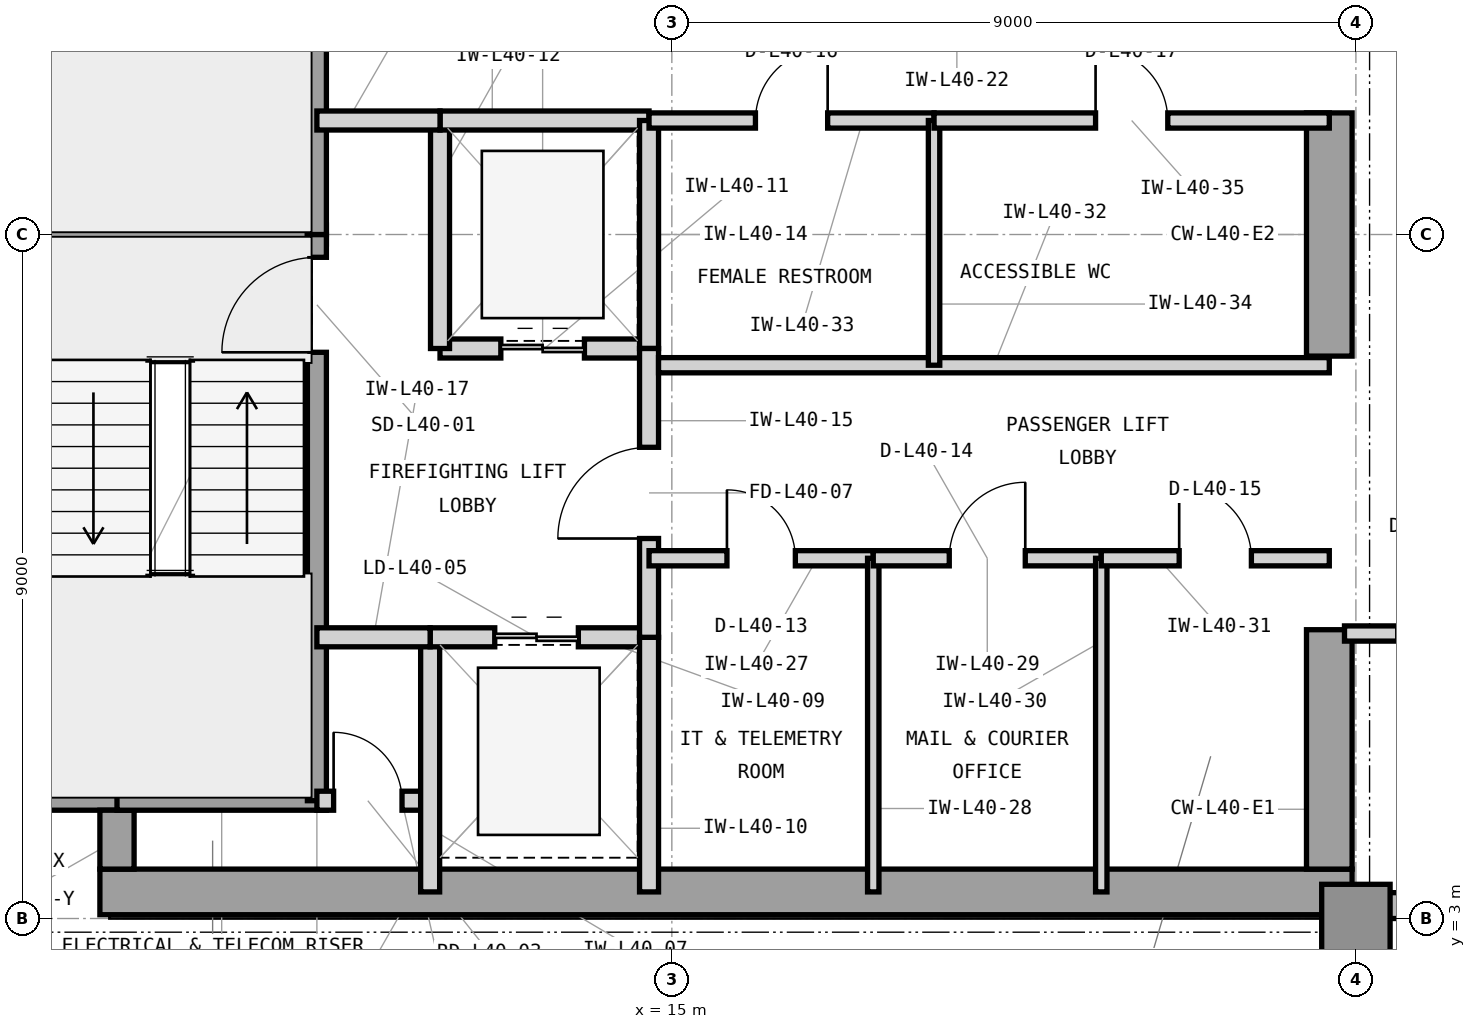
"""IFC4 building model, lengths in metres.
Left out: names, types, materials, properties, quantities, classifications, styles, units other than length and angle.
Written with IfcOpenShell. Run it as: python <this file> out.ifc"""

import sys

from ifc_helpers import new_model, si_unit, direction, frame, frame_2d, origin, origin_2d, place, context, subcontext, project, spatial, rectangle, extrude, element, fill, save


model = new_model("IFC4")
c1 = context("Model", 3, precision=1e-05, world=origin(), true_north=direction((0.0, 1.0)))
c2 = subcontext(c1, "Body", "Model", "MODEL_VIEW")
j1 = project(units=[si_unit("LENGTHUNIT", "METRE"), si_unit("PLANEANGLEUNIT", "RADIAN")], contexts=[c1])
p1 = place(None, origin())
s1 = spatial("IfcSite", under=j1, at=p1, CompositionType="ELEMENT")
p2 = place(p1, origin())
s2 = spatial("IfcBuilding", under=s1, at=p2, CompositionType="ELEMENT")
p3 = place(p2, frame((0.0, 0.0, 168.3)))
s3 = spatial("IfcBuildingStorey", under=s2, at=p3, CompositionType="ELEMENT", Elevation=168.3)
p4 = place(p3, frame((7.475, 3.35, 0.0), z_axis=(0.0, 0.0, 1.0), x_axis=(1.0, 0.0, 0.0)))
e1 = element("IfcWall", 1, at=p4, inside=s3, PredefinedType="SHEAR", context=c2, shape_type="SweptSolid", body=[
    extrude(rectangle(XDim=16.475, YDim=0.6, at=frame_2d((8.237, 0.0))), origin(), (0.0, 0.0, 1.0), 3.9),
])
p5 = place(p3, frame((23.65, 3.65, 0.0), z_axis=(0.0, 0.0, 1.0), x_axis=(0.0, 1.0, 0.0)))
e2 = element("IfcWall", 2, at=p5, inside=s3, PredefinedType="SHEAR", context=c2, shape_type="SweptSolid", body=[
    extrude(rectangle(XDim=3.15, YDim=0.6, at=frame_2d((1.575, 0.0))), origin(), (0.0, 0.0, 1.0), 3.9),
])
p6 = place(p3, frame((23.65, 10.4, 0.0), z_axis=(0.0, 0.0, 1.0), x_axis=(0.0, 1.0, 0.0)))
e3 = element("IfcWall", 3, at=p6, inside=s3, PredefinedType="SHEAR", context=c2, shape_type="SweptSolid", body=[
    extrude(rectangle(XDim=3.2, YDim=0.6, at=frame_2d((1.6, 0.0))), origin(), (0.0, 0.0, 1.0), 3.9),
])
p7 = place(p3, frame((6.65, 4.65, 0.0), z_axis=(0.0, 0.0, 1.0), x_axis=(1.0, 0.0, 0.0)))
e4 = element("IfcWall", 4, at=p7, inside=s3, PredefinedType="SHEAR", context=c2, shape_type="SweptSolid", body=[
    extrude(rectangle(XDim=1.275, YDim=0.45, at=frame_2d((0.638, 0.0))), origin(), (0.0, 0.0, 1.0), 3.9),
])
p8 = place(p3, frame((7.7, 3.65, 0.0), z_axis=(0.0, 0.0, 1.0), x_axis=(0.0, 1.0, 0.0)))
e5 = element("IfcWall", 5, at=p8, inside=s3, PredefinedType="SHEAR", context=c2, shape_type="SweptSolid", body=[
    extrude(rectangle(XDim=0.775, YDim=0.45, at=frame_2d((0.388, 0.0))), origin(), (0.0, 0.0, 1.0), 3.9),
])
p9 = place(p3, frame((24.0, 3.0, 0.0), z_axis=(0.0, 0.0, 1.0), x_axis=(1.0, 0.0, 0.0)))
e6 = element("IfcColumn", 6, at=p9, inside=s3, PredefinedType="COLUMN", context=c2, shape_type="SweptSolid", body=[
    extrude(rectangle(XDim=0.9, YDim=0.9, at=origin_2d()), origin(), (0.0, 0.0, 1.0), 3.9),
])
p10 = place(p3, frame((23.9, 3.17, 0.0), z_axis=(0.0, 0.0, 1.0), x_axis=(1.0, 0.0, 0.0)))
e7 = element("IfcWall", 7, at=p10, inside=s3, PredefinedType="STANDARD", context=c2, shape_type="SweptSolid", body=[
    extrude(rectangle(XDim=31.5, YDim=0.34, at=frame_2d((15.75, 0.0))), origin(), (0.0, 0.0, 1.0), 3.7),
])
p11 = place(p10, frame((5.6, 0.0, 0.9)))
e8 = element("IfcOpeningElement", 8, at=p11, cuts=e7, PredefinedType="OPENING", context=c2, shape_type="SweptSolid", body=[
    extrude(rectangle(XDim=2.3, YDim=2.2, at=frame_2d((1.15, 1.1))), frame((0.0, 0.18, 0.0), z_axis=(0.0, -1.0, 0.0), x_axis=(1.0, 0.0, 0.0)), (0.0, 0.0, 1.0), 0.36),
])
p12 = place(p10, frame((10.1, 0.0, 0.9)))
e9 = element("IfcOpeningElement", 9, at=p12, cuts=e7, PredefinedType="OPENING", context=c2, shape_type="SweptSolid", body=[
    extrude(rectangle(XDim=2.3, YDim=2.2, at=frame_2d((1.15, 1.1))), frame((0.0, 0.18, 0.0), z_axis=(0.0, -1.0, 0.0), x_axis=(1.0, 0.0, 0.0)), (0.0, 0.0, 1.0), 0.36),
])
p13 = place(p10, frame((19.1, 0.0, 0.9)))
e10 = element("IfcOpeningElement", 10, at=p13, cuts=e7, PredefinedType="OPENING", context=c2, shape_type="SweptSolid", body=[
    extrude(rectangle(XDim=2.3, YDim=2.2, at=frame_2d((1.15, 1.1))), frame((0.0, 0.18, 0.0), z_axis=(0.0, -1.0, 0.0), x_axis=(1.0, 0.0, 0.0)), (0.0, 0.0, 1.0), 0.36),
])
p14 = place(p10, frame((0.9, 0.0, 0.9)))
e11 = element("IfcOpeningElement", 11, at=p14, cuts=e7, PredefinedType="OPENING", context=c2, shape_type="SweptSolid", body=[
    extrude(rectangle(XDim=1.6, YDim=2.2, at=frame_2d((0.8, 1.1))), frame((0.0, 0.18, 0.0), z_axis=(0.0, -1.0, 0.0), x_axis=(1.0, 0.0, 0.0)), (0.0, 0.0, 1.0), 0.36),
])
p15 = place(p3, frame((6.35, 12.0, 0.0), z_axis=(0.0, 0.0, 1.0), x_axis=(1.0, 0.0, 0.0)))
e12 = element("IfcWall", 12, at=p15, inside=s3, PredefinedType="SHEAR", context=c2, shape_type="SweptSolid", body=[
    extrude(rectangle(XDim=4.105, YDim=0.25, at=frame_2d((2.052, 0.0))), origin(), (0.0, 0.0, 1.0), 3.9),
])
p16 = place(p3, frame((7.7, 4.55, 0.0), z_axis=(0.0, 0.0, 1.0), x_axis=(1.0, 0.0, 0.0)))
e13 = element("IfcWall", 13, at=p16, inside=s3, PredefinedType="SHEAR", context=c2, shape_type="SweptSolid", body=[
    extrude(rectangle(XDim=2.755, YDim=0.25, at=frame_2d((1.377, 0.0))), origin(), (0.0, 0.0, 1.0), 3.9),
])
p17 = place(p3, frame((10.33, 4.55, 0.0), z_axis=(0.0, 0.0, 1.0), x_axis=(0.0, 1.0, 0.0)))
e14 = element("IfcWall", 14, at=p17, inside=s3, PredefinedType="SHEAR", context=c2, shape_type="SweptSolid", body=[
    extrude(rectangle(XDim=7.45, YDim=0.25, at=frame_2d((3.725, 0.0))), origin(), (0.0, 0.0, 1.0), 3.9),
])
p18 = place(p17, frame((5.9, 0.0, 0.0)))
e15 = element("IfcOpeningElement", 15, at=p18, cuts=e14, PredefinedType="OPENING", context=c2, shape_type="SweptSolid", body=[
    extrude(rectangle(XDim=1.25, YDim=2.2, at=frame_2d((0.625, 1.1))), frame((0.0, 0.135, 0.0), z_axis=(0.0, -1.0, 0.0), x_axis=(1.0, 0.0, 0.0)), (0.0, 0.0, 1.0), 0.27),
])
p19 = place(p3, frame((10.33, 12.0, 0.0), z_axis=(0.0, 0.0, 1.0), x_axis=(0.0, 1.0, 0.0)))
e16 = element("IfcWall", 16, at=p19, inside=s3, PredefinedType="SHEAR", context=c2, shape_type="SweptSolid", body=[
    extrude(rectangle(XDim=7.45, YDim=0.25, at=frame_2d((3.725, 0.0))), origin(), (0.0, 0.0, 1.0), 3.9),
])
p20 = place(p19, frame((5.85, 0.0, 0.0)))
e17 = element("IfcOpeningElement", 17, at=p20, cuts=e16, PredefinedType="OPENING", context=c2, shape_type="SweptSolid", body=[
    extrude(rectangle(XDim=1.25, YDim=2.2, at=frame_2d((0.625, 1.1))), frame((0.0, 0.135, 0.0), z_axis=(0.0, -1.0, 0.0), x_axis=(1.0, 0.0, 0.0)), (0.0, 0.0, 1.0), 0.27),
])
p21 = place(p3, frame((10.33, 4.55, 0.0), z_axis=(0.0, 0.0, 1.0), x_axis=(1.0, 0.0, 0.0)))
e18 = element("IfcWall", 18, at=p21, inside=s3, PredefinedType="PARTITIONING", context=c2, shape_type="SweptSolid", body=[
    extrude(rectangle(XDim=1.49, YDim=0.25, at=frame_2d((0.745, 0.0))), origin(), (0.0, 0.0, 1.0), 3.69),
])
p22 = place(p21, frame((0.22, 0.0, 0.0)))
e19 = element("IfcOpeningElement", 19, at=p22, cuts=e18, PredefinedType="OPENING", context=c2, shape_type="SweptSolid", body=[
    extrude(rectangle(XDim=0.9, YDim=2.1, at=frame_2d((0.45, 1.05))), frame((0.0, 0.135, 0.0), z_axis=(0.0, -1.0, 0.0), x_axis=(1.0, 0.0, 0.0)), (0.0, 0.0, 1.0), 0.27),
])
p23 = place(p3, frame((11.82, 3.35, 0.0), z_axis=(0.0, 0.0, 1.0), x_axis=(0.0, 1.0, 0.0)))
e20 = element("IfcWall", 20, at=p23, inside=s3, PredefinedType="PARTITIONING", context=c2, shape_type="SweptSolid", body=[
    extrude(rectangle(XDim=3.35, YDim=0.25, at=frame_2d((1.675, 0.0))), origin(), (0.0, 0.0, 1.0), 3.69),
])
p24 = place(p3, frame((11.82, 6.7, 0.0), z_axis=(0.0, 0.0, 1.0), x_axis=(1.0, 0.0, 0.0)))
e21 = element("IfcWall", 21, at=p24, inside=s3, PredefinedType="PARTITIONING", context=c2, shape_type="SweptSolid", body=[
    extrude(rectangle(XDim=2.88, YDim=0.25, at=frame_2d((1.44, 0.0))), origin(), (0.0, 0.0, 1.0), 3.283),
])
p25 = place(p24, frame((0.85, 0.0, 0.0)))
e22 = element("IfcOpeningElement", 22, at=p25, cuts=e21, PredefinedType="OPENING", context=c2, shape_type="SweptSolid", body=[
    extrude(rectangle(XDim=1.1, YDim=2.25, at=frame_2d((0.55, 1.125))), frame((0.0, 0.135, 0.0), z_axis=(0.0, -1.0, 0.0), x_axis=(1.0, 0.0, 0.0)), (0.0, 0.0, 1.0), 0.27),
])
p26 = place(p3, frame((14.7, 3.35, 0.0), z_axis=(0.0, 0.0, 1.0), x_axis=(0.0, 1.0, 0.0)))
e23 = element("IfcWall", 23, at=p26, inside=s3, PredefinedType="PARTITIONING", context=c2, shape_type="SweptSolid", body=[
    extrude(rectangle(XDim=3.35, YDim=0.25, at=frame_2d((1.675, 0.0))), origin(), (0.0, 0.0, 1.0), 3.69),
])
p27 = place(p3, frame((11.95, 10.5, 0.0), z_axis=(0.0, 0.0, 1.0), x_axis=(1.0, 0.0, 0.0)))
e24 = element("IfcWall", 24, at=p27, inside=s3, PredefinedType="PARTITIONING", context=c2, shape_type="SweptSolid", body=[
    extrude(rectangle(XDim=2.75, YDim=0.25, at=frame_2d((1.375, 0.0))), origin(), (0.0, 0.0, 1.0), 3.283),
])
p28 = place(p27, frame((0.8, 0.0, 0.0)))
e25 = element("IfcOpeningElement", 25, at=p28, cuts=e24, PredefinedType="OPENING", context=c2, shape_type="SweptSolid", body=[
    extrude(rectangle(XDim=1.1, YDim=2.25, at=frame_2d((0.55, 1.125))), frame((0.0, 0.135, 0.0), z_axis=(0.0, -1.0, 0.0), x_axis=(1.0, 0.0, 0.0)), (0.0, 0.0, 1.0), 0.27),
])
p29 = place(p3, frame((11.95, 10.5, 0.0), z_axis=(0.0, 0.0, 1.0), x_axis=(0.0, 1.0, 0.0)))
e26 = element("IfcWall", 26, at=p29, inside=s3, PredefinedType="PARTITIONING", context=c2, shape_type="SweptSolid", body=[
    extrude(rectangle(XDim=3.0, YDim=0.25, at=frame_2d((1.5, 0.0))), origin(), (0.0, 0.0, 1.0), 3.69),
])
p30 = place(p3, frame((11.95, 13.5, 0.0), z_axis=(0.0, 0.0, 1.0), x_axis=(1.0, 0.0, 0.0)))
e27 = element("IfcWall", 27, at=p30, inside=s3, PredefinedType="PARTITIONING", context=c2, shape_type="SweptSolid", body=[
    extrude(rectangle(XDim=2.75, YDim=0.25, at=frame_2d((1.375, 0.0))), origin(), (0.0, 0.0, 1.0), 3.283),
])
p31 = place(p3, frame((14.7, 10.5, 0.0), z_axis=(0.0, 0.0, 1.0), x_axis=(0.0, 1.0, 0.0)))
e28 = element("IfcWall", 28, at=p31, inside=s3, PredefinedType="PARTITIONING", context=c2, shape_type="SweptSolid", body=[
    extrude(rectangle(XDim=3.0, YDim=0.25, at=frame_2d((1.5, 0.0))), origin(), (0.0, 0.0, 1.0), 3.69),
])
p32 = place(p3, frame((14.7, 6.7, 0.0), z_axis=(0.0, 0.0, 1.0), x_axis=(0.0, 1.0, 0.0)))
e29 = element("IfcWall", 29, at=p32, inside=s3, PredefinedType="PARTITIONING", context=c2, shape_type="SweptSolid", body=[
    extrude(rectangle(XDim=3.8, YDim=0.25, at=frame_2d((1.9, 0.0))), origin(), (0.0, 0.0, 1.0), 3.69),
])
p33 = place(p32, frame((1.3, 0.0, 0.0)))
e30 = element("IfcOpeningElement", 30, at=p33, cuts=e29, PredefinedType="OPENING", context=c2, shape_type="SweptSolid", body=[
    extrude(rectangle(XDim=1.2, YDim=2.2, at=frame_2d((0.6, 1.1))), frame((0.0, 0.135, 0.0), z_axis=(0.0, -1.0, 0.0), x_axis=(1.0, 0.0, 0.0)), (0.0, 0.0, 1.0), 0.27),
])
p34 = place(p3, frame((10.33, 13.5, 0.0), z_axis=(0.0, 0.0, 1.0), x_axis=(1.0, 0.0, 0.0)))
e31 = element("IfcWall", 31, at=p34, inside=s3, PredefinedType="PARTITIONING", context=c2, shape_type="SweptSolid", body=[
    extrude(rectangle(XDim=1.62, YDim=0.25, at=frame_2d((0.81, 0.0))), origin(), (0.0, 0.0, 1.0), 3.283),
])
p35 = place(p3, frame((10.33, 6.7, 0.0), z_axis=(0.0, 0.0, 1.0), x_axis=(1.0, 0.0, 0.0)))
e32 = element("IfcWall", 32, at=p35, inside=s3, PredefinedType="PARTITIONING", context=c2, shape_type="SweptSolid", body=[
    extrude(rectangle(XDim=1.49, YDim=0.25, at=frame_2d((0.745, 0.0))), origin(), (0.0, 0.0, 1.0), 3.283),
])
p36 = place(p3, frame((14.7, 7.74, 0.0), z_axis=(0.0, 0.0, 1.0), x_axis=(1.0, 0.0, 0.0)))
e33 = element("IfcWall", 33, at=p36, inside=s3, PredefinedType="PARTITIONING", context=c2, shape_type="SweptSolid", body=[
    extrude(rectangle(XDim=2.95, YDim=0.2, at=frame_2d((1.475, 0.0))), origin(), (0.0, 0.0, 1.0), 3.69),
])
p37 = place(p36, frame((1.025, 0.0, 0.0)))
e34 = element("IfcOpeningElement", 34, at=p37, cuts=e33, PredefinedType="OPENING", context=c2, shape_type="SweptSolid", body=[
    extrude(rectangle(XDim=0.9, YDim=2.1, at=frame_2d((0.45, 1.05))), frame((0.0, 0.11, 0.0), z_axis=(0.0, -1.0, 0.0), x_axis=(1.0, 0.0, 0.0)), (0.0, 0.0, 1.0), 0.22),
])
p38 = place(p3, frame((17.65, 3.35, 0.0), z_axis=(0.0, 0.0, 1.0), x_axis=(0.0, 1.0, 0.0)))
e35 = element("IfcWall", 35, at=p38, inside=s3, PredefinedType="PARTITIONING", context=c2, shape_type="SweptSolid", body=[
    extrude(rectangle(XDim=4.39, YDim=0.15, at=frame_2d((2.195, 0.0))), origin(), (0.0, 0.0, 1.0), 3.69),
])
p39 = place(p3, frame((17.65, 7.74, 0.0), z_axis=(0.0, 0.0, 1.0), x_axis=(1.0, 0.0, 0.0)))
e36 = element("IfcWall", 36, at=p39, inside=s3, PredefinedType="PARTITIONING", context=c2, shape_type="SweptSolid", body=[
    extrude(rectangle(XDim=3.0, YDim=0.2, at=frame_2d((1.5, 0.0))), origin(), (0.0, 0.0, 1.0), 3.69),
])
p40 = place(p39, frame((1.0, 0.0, 0.0)))
e37 = element("IfcOpeningElement", 37, at=p40, cuts=e36, PredefinedType="OPENING", context=c2, shape_type="SweptSolid", body=[
    extrude(rectangle(XDim=1.0, YDim=2.15, at=frame_2d((0.5, 1.075))), frame((0.0, 0.11, 0.0), z_axis=(0.0, -1.0, 0.0), x_axis=(1.0, 0.0, 0.0)), (0.0, 0.0, 1.0), 0.22),
])
p41 = place(p3, frame((20.65, 3.35, 0.0), z_axis=(0.0, 0.0, 1.0), x_axis=(0.0, 1.0, 0.0)))
e38 = element("IfcWall", 38, at=p41, inside=s3, PredefinedType="PARTITIONING", context=c2, shape_type="SweptSolid", body=[
    extrude(rectangle(XDim=4.39, YDim=0.15, at=frame_2d((2.195, 0.0))), origin(), (0.0, 0.0, 1.0), 3.69),
])
p42 = place(p3, frame((20.65, 7.74, 0.0), z_axis=(0.0, 0.0, 1.0), x_axis=(1.0, 0.0, 0.0)))
e39 = element("IfcWall", 39, at=p42, inside=s3, PredefinedType="PARTITIONING", context=c2, shape_type="SweptSolid", body=[
    extrude(rectangle(XDim=3.0, YDim=0.2, at=frame_2d((1.5, 0.0))), origin(), (0.0, 0.0, 1.0), 3.69),
])
p43 = place(p42, frame((1.025, 0.0, 0.0)))
e40 = element("IfcOpeningElement", 40, at=p43, cuts=e39, PredefinedType="OPENING", context=c2, shape_type="SweptSolid", body=[
    extrude(rectangle(XDim=0.95, YDim=2.1, at=frame_2d((0.475, 1.05))), frame((0.0, 0.11, 0.0), z_axis=(0.0, -1.0, 0.0), x_axis=(1.0, 0.0, 0.0)), (0.0, 0.0, 1.0), 0.22),
])
p44 = place(p3, frame((14.825, 10.28, 0.0), z_axis=(0.0, 0.0, 1.0), x_axis=(1.0, 0.0, 0.0)))
e41 = element("IfcWall", 41, at=p44, inside=s3, PredefinedType="PARTITIONING", context=c2, shape_type="SweptSolid", body=[
    extrude(rectangle(XDim=8.825, YDim=0.2, at=frame_2d((4.413, 0.0))), origin(), (0.0, 0.0, 1.0), 3.69),
])
p45 = place(p3, frame((14.7, 13.5, 0.0), z_axis=(0.0, 0.0, 1.0), x_axis=(1.0, 0.0, 0.0)))
e42 = element("IfcWall", 42, at=p45, inside=s3, PredefinedType="PARTITIONING", context=c2, shape_type="SweptSolid", body=[
    extrude(rectangle(XDim=3.75, YDim=0.2, at=frame_2d((1.875, 0.0))), origin(), (0.0, 0.0, 1.0), 3.283),
])
p46 = place(p45, frame((1.4, 0.0, 0.0)))
e43 = element("IfcOpeningElement", 43, at=p46, cuts=e42, PredefinedType="OPENING", context=c2, shape_type="SweptSolid", body=[
    extrude(rectangle(XDim=0.95, YDim=2.1, at=frame_2d((0.475, 1.05))), frame((0.0, 0.11, 0.0), z_axis=(0.0, -1.0, 0.0), x_axis=(1.0, 0.0, 0.0)), (0.0, 0.0, 1.0), 0.22),
])
p47 = place(p3, frame((18.45, 10.28, 0.0), z_axis=(0.0, 0.0, 1.0), x_axis=(0.0, 1.0, 0.0)))
e44 = element("IfcWall", 44, at=p47, inside=s3, PredefinedType="PARTITIONING", context=c2, shape_type="SweptSolid", body=[
    extrude(rectangle(XDim=3.22, YDim=0.15, at=frame_2d((1.61, 0.0))), origin(), (0.0, 0.0, 1.0), 3.69),
])
p48 = place(p3, frame((18.45, 13.5, 0.0), z_axis=(0.0, 0.0, 1.0), x_axis=(1.0, 0.0, 0.0)))
e45 = element("IfcWall", 45, at=p48, inside=s3, PredefinedType="PARTITIONING", context=c2, shape_type="SweptSolid", body=[
    extrude(rectangle(XDim=5.2, YDim=0.2, at=frame_2d((2.6, 0.0))), origin(), (0.0, 0.0, 1.0), 3.283),
])
p49 = place(p48, frame((2.125, 0.0, 0.0)))
e46 = element("IfcOpeningElement", 46, at=p49, cuts=e45, PredefinedType="OPENING", context=c2, shape_type="SweptSolid", body=[
    extrude(rectangle(XDim=0.95, YDim=2.1, at=frame_2d((0.475, 1.05))), frame((0.0, 0.11, 0.0), z_axis=(0.0, -1.0, 0.0), x_axis=(1.0, 0.0, 0.0)), (0.0, 0.0, 1.0), 0.22),
])
p50 = place(p3, frame((23.85, 6.75, 0.0), z_axis=(0.0, 0.0, 1.0), x_axis=(1.0, 0.0, 0.0)))
e47 = element("IfcWall", 47, at=p50, inside=s3, PredefinedType="PARTITIONING", context=c2, shape_type="SweptSolid", body=[
    extrude(rectangle(XDim=2.85, YDim=0.2, at=frame_2d((1.425, 0.0))), origin(), (0.0, 0.0, 1.0), 3.69),
])
p51 = place(p50, frame((0.7, 0.0, 0.0)))
e48 = element("IfcOpeningElement", 48, at=p51, cuts=e47, PredefinedType="OPENING", context=c2, shape_type="SweptSolid", body=[
    extrude(rectangle(XDim=1.0, YDim=2.15, at=frame_2d((0.5, 1.075))), frame((0.0, 0.11, 0.0), z_axis=(0.0, -1.0, 0.0), x_axis=(1.0, 0.0, 0.0)), (0.0, 0.0, 1.0), 0.22),
])
p52 = place(p18, origin())
e49 = element("IfcDoor", 49, at=p52, inside=s3, OperationType="SINGLE_SWING_LEFT", PredefinedType="DOOR", context=c2, shape_type="SweptSolid", body=[
    extrude(rectangle(XDim=1.25, YDim=2.2, at=frame_2d((0.625, 1.1))), frame((0.0, 0.025, 0.0), z_axis=(0.0, -1.0, 0.0), x_axis=(1.0, 0.0, 0.0)), (0.0, 0.0, 1.0), 0.05),
])
fill(e15, e49)
p53 = place(p22, origin())
e50 = element("IfcDoor", 50, at=p53, inside=s3, OperationType="SINGLE_SWING_LEFT", PredefinedType="TRAPDOOR", context=c2, shape_type="SweptSolid", body=[
    extrude(rectangle(XDim=0.9, YDim=2.1, at=frame_2d((0.45, 1.05))), frame((0.0, 0.025, 0.0), z_axis=(0.0, -1.0, 0.0), x_axis=(1.0, 0.0, 0.0)), (0.0, 0.0, 1.0), 0.05),
])
fill(e19, e50)
p54 = place(p25, origin())
e51 = element("IfcDoor", 51, at=p54, inside=s3, OperationType="DOUBLE_DOOR_SLIDING", PredefinedType="DOOR", context=c2, shape_type="SweptSolid", body=[
    extrude(rectangle(XDim=1.1, YDim=2.25, at=frame_2d((0.55, 1.125))), frame((0.0, 0.025, 0.0), z_axis=(0.0, -1.0, 0.0), x_axis=(1.0, 0.0, 0.0)), (0.0, 0.0, 1.0), 0.05),
])
fill(e22, e51)
p55 = place(p28, origin())
e52 = element("IfcDoor", 52, at=p55, inside=s3, OperationType="DOUBLE_DOOR_SLIDING", PredefinedType="DOOR", context=c2, shape_type="SweptSolid", body=[
    extrude(rectangle(XDim=1.1, YDim=2.25, at=frame_2d((0.55, 1.125))), frame((0.0, 0.025, 0.0), z_axis=(0.0, -1.0, 0.0), x_axis=(1.0, 0.0, 0.0)), (0.0, 0.0, 1.0), 0.05),
])
fill(e25, e52)
p56 = place(p33, origin())
e53 = element("IfcDoor", 53, at=p56, inside=s3, OperationType="SINGLE_SWING_LEFT", PredefinedType="DOOR", context=c2, shape_type="SweptSolid", body=[
    extrude(rectangle(XDim=1.2, YDim=2.2, at=frame_2d((0.6, 1.1))), frame((0.0, 0.025, 0.0), z_axis=(0.0, -1.0, 0.0), x_axis=(1.0, 0.0, 0.0)), (0.0, 0.0, 1.0), 0.05),
])
fill(e30, e53)
p57 = place(p37, origin())
e54 = element("IfcDoor", 54, at=p57, inside=s3, OperationType="SINGLE_SWING_LEFT", PredefinedType="TRAPDOOR", context=c2, shape_type="SweptSolid", body=[
    extrude(rectangle(XDim=0.9, YDim=2.1, at=frame_2d((0.45, 1.05))), frame((0.0, 0.025, 0.0), z_axis=(0.0, -1.0, 0.0), x_axis=(1.0, 0.0, 0.0)), (0.0, 0.0, 1.0), 0.05),
])
fill(e34, e54)
p58 = place(p40, origin())
e55 = element("IfcDoor", 55, at=p58, inside=s3, OperationType="SINGLE_SWING_RIGHT", PredefinedType="DOOR", context=c2, shape_type="SweptSolid", body=[
    extrude(rectangle(XDim=1.0, YDim=2.15, at=frame_2d((0.5, 1.075))), frame((0.0, 0.025, 0.0), z_axis=(0.0, -1.0, 0.0), x_axis=(1.0, 0.0, 0.0)), (0.0, 0.0, 1.0), 0.05),
])
fill(e37, e55)
p59 = place(p43, origin())
e56 = element("IfcDoor", 56, at=p59, inside=s3, OperationType="SINGLE_SWING_LEFT", PredefinedType="DOOR", context=c2, shape_type="SweptSolid", body=[
    extrude(rectangle(XDim=0.95, YDim=2.1, at=frame_2d((0.475, 1.05))), frame((0.0, 0.025, 0.0), z_axis=(0.0, -1.0, 0.0), x_axis=(1.0, 0.0, 0.0)), (0.0, 0.0, 1.0), 0.05),
])
fill(e40, e56)
p60 = place(p46, origin())
e57 = element("IfcDoor", 57, at=p60, inside=s3, OperationType="SINGLE_SWING_RIGHT", PredefinedType="DOOR", context=c2, shape_type="SweptSolid", body=[
    extrude(rectangle(XDim=0.95, YDim=2.1, at=frame_2d((0.475, 1.05))), frame((0.0, 0.025, 0.0), z_axis=(0.0, -1.0, 0.0), x_axis=(1.0, 0.0, 0.0)), (0.0, 0.0, 1.0), 0.05),
])
fill(e43, e57)
p61 = place(p49, origin())
e58 = element("IfcDoor", 58, at=p61, inside=s3, OperationType="SINGLE_SWING_LEFT", PredefinedType="DOOR", context=c2, shape_type="SweptSolid", body=[
    extrude(rectangle(XDim=0.95, YDim=2.1, at=frame_2d((0.475, 1.05))), frame((0.0, 0.025, 0.0), z_axis=(0.0, -1.0, 0.0), x_axis=(1.0, 0.0, 0.0)), (0.0, 0.0, 1.0), 0.05),
])
fill(e46, e58)
save(model, sys.argv[1])
